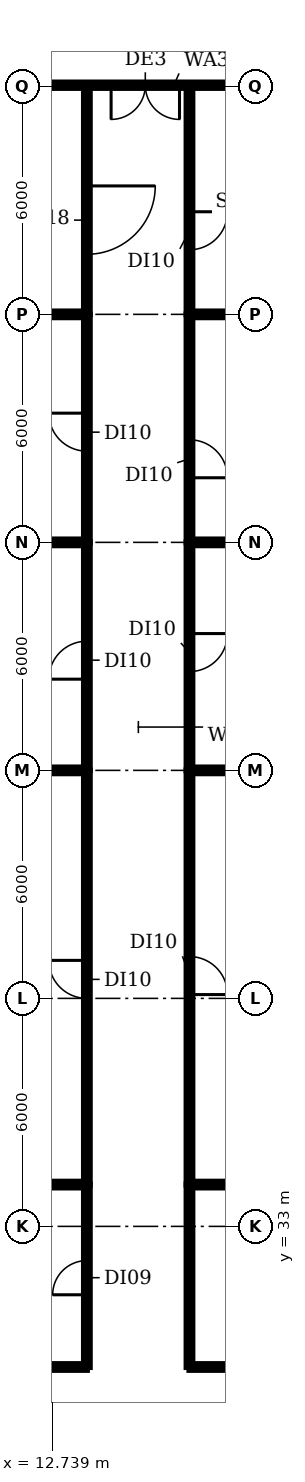
"""IFC4 building model, lengths in metres.
Left out: names, types, materials, properties, quantities, classifications, styles, units other than length and angle.
Written with IfcOpenShell. Run it as: python <this file> out.ifc"""

import sys

from ifc_helpers import new_model, si_unit, direction, frame, frame_2d, origin, place, context, subcontext, project, spatial, rectangle, extrude, element, fill, save


model = new_model("IFC4")
c1 = context("Model", 3, precision=1e-05, world=origin(), true_north=direction((0.0, 1.0)))
c2 = subcontext(c1, "Body", "Model", "MODEL_VIEW")
j1 = project(units=[si_unit("LENGTHUNIT", "METRE"), si_unit("PLANEANGLEUNIT", "RADIAN")], contexts=[c1])
p1 = place(None, origin())
s1 = spatial("IfcSite", under=j1, at=p1, CompositionType="ELEMENT")
p2 = place(p1, origin())
s2 = spatial("IfcBuilding", under=s1, at=p2, CompositionType="ELEMENT")
p3 = place(p2, frame((0.0, 0.0, 155.0)))
s3 = spatial("IfcBuildingStorey", under=s2, at=p3, CompositionType="ELEMENT", Elevation=155.0)
p4 = place(p3, frame((19.332, 63.03, 0.0), z_axis=(0.0, 0.0, 1.0), x_axis=(-1.0, 0.0, 0.0)))
e1 = element("IfcWall", 1, at=p4, inside=s3, PredefinedType="SOLIDWALL", context=c2, shape_type="SweptSolid", body=[
    extrude(rectangle(XDim=6.787, YDim=0.14, at=frame_2d((3.394, 0.0))), origin(), (0.0, 0.0, 1.0), 3.85),
])
p5 = place(p4, frame((3.244, 0.0, 0.0)))
e2 = element("IfcOpeningElement", 2, at=p5, cuts=e1, PredefinedType="OPENING", context=c2, shape_type="SweptSolid", body=[
    extrude(rectangle(XDim=1.8, YDim=2.4, at=frame_2d((0.9, 1.2))), frame((0.0, 0.08, 0.0), z_axis=(0.0, -1.0, 0.0), x_axis=(1.0, 0.0, 0.0)), (0.0, 0.0, 1.0), 0.16),
])
p6 = place(p3, frame((-0.98, 34.1, 0.0), z_axis=(0.0, 0.0, 1.0), x_axis=(1.0, 0.0, 0.0)))
e3 = element("IfcWall", 3, at=p6, inside=s3, PredefinedType="PARTITIONING", context=c2, shape_type="SweptSolid", body=[
    extrude(rectangle(XDim=14.63, YDim=0.15, at=frame_2d((7.315, 0.0))), origin(), (0.0, 0.0, 1.0), 2.88),
])
for number, where, z_axis, x_axis in (
    (4, (-0.965, 45.0, 0.0), (0.0, 0.0, 1.0), (1.0, 0.0, 0.0)),
    (5, (-0.965, 51.0, 0.0), (0.0, 0.0, 1.0), (1.0, 0.0, 0.0)),
    (6, (-0.965, 57.0, 0.0), (0.0, 0.0, 1.0), (1.0, 0.0, 0.0)),
):
    element("IfcWall", number, at=place(p3, frame(where, z_axis=z_axis, x_axis=x_axis)), inside=s3, PredefinedType="PARTITIONING", context=c2, shape_type="SweptSolid", body=[
        extrude(rectangle(XDim=14.615, YDim=0.15, at=frame_2d((7.308, 0.0))), origin(), (0.0, 0.0, 1.0), 2.88),
    ])
p7 = place(p3, frame((8.8, 29.3, 0.0), z_axis=(0.0, 0.0, 1.0), x_axis=(1.0, 0.0, 0.0)))
e7 = element("IfcWall", 7, at=p7, inside=s3, PredefinedType="PARTITIONING", context=c2, shape_type="SweptSolid", body=[
    extrude(rectangle(XDim=4.85, YDim=0.15, at=frame_2d((2.425, 0.0))), origin(), (0.0, 0.0, 1.0), 2.88),
])
p8 = place(p3, frame((13.65, 29.3, 0.0), z_axis=(0.0, 0.0, 1.0), x_axis=(0.0, 1.0, 0.0)))
e8 = element("IfcWall", 8, at=p8, inside=s3, PredefinedType="PARTITIONING", context=c2, shape_type="SweptSolid", body=[
    extrude(rectangle(XDim=4.8, YDim=0.15, at=frame_2d((2.4, 0.0))), origin(), (0.0, 0.0, 1.0), 2.88),
])
p9 = place(p8, frame((1.9, 0.0, 0.0)))
e9 = element("IfcOpeningElement", 9, at=p9, cuts=e8, PredefinedType="OPENING", context=c2, shape_type="SweptSolid", body=[
    extrude(rectangle(XDim=0.9, YDim=2.1, at=frame_2d((0.45, 1.05))), frame((0.0, 0.085, 0.0), z_axis=(0.0, -1.0, 0.0), x_axis=(1.0, 0.0, 0.0)), (0.0, 0.0, 1.0), 0.17),
])
p10 = place(p3, frame((13.65, 34.1, 0.0), z_axis=(0.0, 0.0, 1.0), x_axis=(0.0, 1.0, 0.0)))
e10 = element("IfcWall", 10, at=p10, inside=s3, PredefinedType="PARTITIONING", context=c2, shape_type="SweptSolid", body=[
    extrude(rectangle(XDim=10.9, YDim=0.15, at=frame_2d((5.45, 0.0))), origin(), (0.0, 0.0, 1.0), 2.88),
])
p11 = place(p10, frame((4.9, 0.0, 0.0)))
e11 = element("IfcOpeningElement", 11, at=p11, cuts=e10, PredefinedType="OPENING", context=c2, shape_type="SweptSolid", body=[
    extrude(rectangle(XDim=1.0, YDim=2.1, at=frame_2d((0.5, 1.05))), frame((0.0, 0.085, 0.0), z_axis=(0.0, -1.0, 0.0), x_axis=(1.0, 0.0, 0.0)), (0.0, 0.0, 1.0), 0.17),
])
p12 = place(p3, frame((13.65, 45.0, 0.0), z_axis=(0.0, 0.0, 1.0), x_axis=(0.0, 1.0, 0.0)))
e12 = element("IfcWall", 12, at=p12, inside=s3, PredefinedType="PARTITIONING", context=c2, shape_type="SweptSolid", body=[
    extrude(rectangle(XDim=6.0, YDim=0.15, at=frame_2d((3.0, 0.0))), origin(), (0.0, 0.0, 1.0), 2.88),
])
p13 = place(p12, frame((2.4, 0.0, 0.0)))
e13 = element("IfcOpeningElement", 13, at=p13, cuts=e12, PredefinedType="OPENING", context=c2, shape_type="SweptSolid", body=[
    extrude(rectangle(XDim=1.0, YDim=2.1, at=frame_2d((0.5, 1.05))), frame((0.0, 0.085, 0.0), z_axis=(0.0, -1.0, 0.0), x_axis=(1.0, 0.0, 0.0)), (0.0, 0.0, 1.0), 0.17),
])
p14 = place(p3, frame((13.65, 51.0, 0.0), z_axis=(0.0, 0.0, 1.0), x_axis=(0.0, 1.0, 0.0)))
e14 = element("IfcWall", 14, at=p14, inside=s3, PredefinedType="PARTITIONING", context=c2, shape_type="SweptSolid", body=[
    extrude(rectangle(XDim=6.0, YDim=0.15, at=frame_2d((3.0, 0.0))), origin(), (0.0, 0.0, 1.0), 2.88),
])
p15 = place(p14, frame((2.4, 0.0, 0.0)))
e15 = element("IfcOpeningElement", 15, at=p15, cuts=e14, PredefinedType="OPENING", context=c2, shape_type="SweptSolid", body=[
    extrude(rectangle(XDim=1.0, YDim=2.1, at=frame_2d((0.5, 1.05))), frame((0.0, 0.085, 0.0), z_axis=(0.0, -1.0, 0.0), x_axis=(1.0, 0.0, 0.0)), (0.0, 0.0, 1.0), 0.17),
])
p16 = place(p3, frame((13.65, 62.98, 0.0), z_axis=(0.0, 0.0, 1.0), x_axis=(0.0, -1.0, 0.0)))
e16 = element("IfcWall", 16, at=p16, inside=s3, PredefinedType="PARTITIONING", context=c2, shape_type="SweptSolid", body=[
    extrude(rectangle(XDim=5.98, YDim=0.15, at=frame_2d((2.99, 0.0))), origin(), (0.0, 0.0, 1.0), 2.88),
])
p17 = place(p16, frame((2.6, 0.0, 0.0)))
e17 = element("IfcOpeningElement", 17, at=p17, cuts=e16, PredefinedType="OPENING", context=c2, shape_type="SweptSolid", body=[
    extrude(rectangle(XDim=1.8, YDim=2.1, at=frame_2d((0.9, 1.05))), frame((0.0, 0.085, 0.0), z_axis=(0.0, -1.0, 0.0), x_axis=(1.0, 0.0, 0.0)), (0.0, 0.0, 1.0), 0.17),
])
p18 = place(p3, frame((16.35, 29.3, 0.0), z_axis=(0.0, 0.0, 1.0), x_axis=(0.0, 1.0, 0.0)))
e18 = element("IfcWall", 18, at=p18, inside=s3, PredefinedType="PARTITIONING", context=c2, shape_type="SweptSolid", body=[
    extrude(rectangle(XDim=4.8, YDim=0.15, at=frame_2d((2.4, 0.0))), origin(), (0.0, 0.0, 1.0), 2.88),
])
p19 = place(p3, frame((16.35, 29.3, 0.0), z_axis=(0.0, 0.0, 1.0), x_axis=(1.0, 0.0, 0.0)))
e19 = element("IfcWall", 19, at=p19, inside=s3, PredefinedType="PARTITIONING", context=c2, shape_type="SweptSolid", body=[
    extrude(rectangle(XDim=5.51, YDim=0.15, at=frame_2d((2.755, 0.0))), origin(), (0.0, 0.0, 1.0), 2.88),
])
p20 = place(p3, frame((16.35, 34.1, 0.0), z_axis=(0.0, 0.0, 1.0), x_axis=(1.0, 0.0, 0.0)))
e20 = element("IfcWall", 20, at=p20, inside=s3, PredefinedType="PARTITIONING", context=c2, shape_type="SweptSolid", body=[
    extrude(rectangle(XDim=9.11, YDim=0.15, at=frame_2d((4.555, 0.0))), origin(), (0.0, 0.0, 1.0), 2.88),
])
p21 = place(p3, frame((16.35, 45.0, 0.0), z_axis=(0.0, 0.0, 1.0), x_axis=(0.0, -1.0, 0.0)))
e21 = element("IfcWall", 21, at=p21, inside=s3, PredefinedType="PARTITIONING", context=c2, shape_type="SweptSolid", body=[
    extrude(rectangle(XDim=10.9, YDim=0.15, at=frame_2d((5.45, 0.0))), origin(), (0.0, 0.0, 1.0), 2.88),
])
p22 = place(p21, frame((4.9, 0.0, 0.0)))
e22 = element("IfcOpeningElement", 22, at=p22, cuts=e21, PredefinedType="OPENING", context=c2, shape_type="SweptSolid", body=[
    extrude(rectangle(XDim=1.0, YDim=2.1, at=frame_2d((0.5, 1.05))), frame((0.0, 0.085, 0.0), z_axis=(0.0, -1.0, 0.0), x_axis=(1.0, 0.0, 0.0)), (0.0, 0.0, 1.0), 0.17),
])
p23 = place(p3, frame((16.35, 45.0, 0.0), z_axis=(0.0, 0.0, 1.0), x_axis=(1.0, 0.0, 0.0)))
e23 = element("IfcWall", 23, at=p23, inside=s3, PredefinedType="PARTITIONING", context=c2, shape_type="SweptSolid", body=[
    extrude(rectangle(XDim=9.78, YDim=0.15, at=frame_2d((4.89, 0.0))), origin(), (0.0, 0.0, 1.0), 2.88),
])
p24 = place(p3, frame((16.35, 51.0, 0.0), z_axis=(0.0, 0.0, 1.0), x_axis=(0.0, -1.0, 0.0)))
e24 = element("IfcWall", 24, at=p24, inside=s3, PredefinedType="PARTITIONING", context=c2, shape_type="SweptSolid", body=[
    extrude(rectangle(XDim=6.0, YDim=0.15, at=frame_2d((3.0, 0.0))), origin(), (0.0, 0.0, 1.0), 2.88),
])
p25 = place(p24, frame((2.4, 0.0, 0.0)))
e25 = element("IfcOpeningElement", 25, at=p25, cuts=e24, PredefinedType="OPENING", context=c2, shape_type="SweptSolid", body=[
    extrude(rectangle(XDim=1.0, YDim=2.1, at=frame_2d((0.5, 1.05))), frame((0.0, 0.085, 0.0), z_axis=(0.0, -1.0, 0.0), x_axis=(1.0, 0.0, 0.0)), (0.0, 0.0, 1.0), 0.17),
])
p26 = place(p3, frame((16.35, 51.0, 0.0), z_axis=(0.0, 0.0, 1.0), x_axis=(1.0, 0.0, 0.0)))
e26 = element("IfcWall", 26, at=p26, inside=s3, PredefinedType="PARTITIONING", context=c2, shape_type="SweptSolid", body=[
    extrude(rectangle(XDim=10.14, YDim=0.15, at=frame_2d((5.07, 0.0))), origin(), (0.0, 0.0, 1.0), 2.88),
])
p27 = place(p3, frame((16.35, 57.0, 0.0), z_axis=(0.0, 0.0, 1.0), x_axis=(0.0, -1.0, 0.0)))
e27 = element("IfcWall", 27, at=p27, inside=s3, PredefinedType="PARTITIONING", context=c2, shape_type="SweptSolid", body=[
    extrude(rectangle(XDim=6.0, YDim=0.15, at=frame_2d((3.0, 0.0))), origin(), (0.0, 0.0, 1.0), 2.88),
])
p28 = place(p27, frame((3.3, 0.0, 0.0)))
e28 = element("IfcOpeningElement", 28, at=p28, cuts=e27, PredefinedType="OPENING", context=c2, shape_type="SweptSolid", body=[
    extrude(rectangle(XDim=1.0, YDim=2.1, at=frame_2d((0.5, 1.05))), frame((0.0, 0.085, 0.0), z_axis=(0.0, -1.0, 0.0), x_axis=(1.0, 0.0, 0.0)), (0.0, 0.0, 1.0), 0.17),
])
p29 = place(p3, frame((16.35, 57.0, 0.0), z_axis=(0.0, 0.0, 1.0), x_axis=(1.0, 0.0, 0.0)))
e29 = element("IfcWall", 29, at=p29, inside=s3, PredefinedType="PARTITIONING", context=c2, shape_type="SweptSolid", body=[
    extrude(rectangle(XDim=10.51, YDim=0.15, at=frame_2d((5.255, 0.0))), origin(), (0.0, 0.0, 1.0), 2.88),
])
p30 = place(p3, frame((16.35, 62.98, 0.0), z_axis=(0.0, 0.0, 1.0), x_axis=(0.0, -1.0, 0.0)))
e30 = element("IfcWall", 30, at=p30, inside=s3, PredefinedType="PARTITIONING", context=c2, shape_type="SweptSolid", body=[
    extrude(rectangle(XDim=5.98, YDim=0.15, at=frame_2d((2.99, 0.0))), origin(), (0.0, 0.0, 1.0), 2.88),
])
p31 = place(p30, frame((3.28, 0.0, 0.0)))
e31 = element("IfcOpeningElement", 31, at=p31, cuts=e30, PredefinedType="OPENING", context=c2, shape_type="SweptSolid", body=[
    extrude(rectangle(XDim=1.0, YDim=2.1, at=frame_2d((0.5, 1.05))), frame((0.0, 0.085, 0.0), z_axis=(0.0, -1.0, 0.0), x_axis=(1.0, 0.0, 0.0)), (0.0, 0.0, 1.0), 0.17),
])
p32 = place(p5, origin())
e32 = element("IfcDoor", 32, at=p32, inside=s3, OperationType="DOUBLE_DOOR_DOUBLE_SWING", PredefinedType="DOOR", context=c2, shape_type="SweptSolid", body=[
    extrude(rectangle(XDim=1.8, YDim=2.4, at=frame_2d((0.9, 1.2))), frame((0.0, 0.025, 0.0), z_axis=(0.0, -1.0, 0.0), x_axis=(1.0, 0.0, 0.0)), (0.0, 0.0, 1.0), 0.05),
])
fill(e2, e32)
p33 = place(p9, origin())
e33 = element("IfcDoor", 33, at=p33, inside=s3, OperationType="SINGLE_SWING_LEFT", PredefinedType="DOOR", context=c2, shape_type="SweptSolid", body=[
    extrude(rectangle(XDim=0.9, YDim=2.1, at=frame_2d((0.45, 1.05))), frame((0.0, 0.025, 0.0), z_axis=(0.0, -1.0, 0.0), x_axis=(1.0, 0.0, 0.0)), (0.0, 0.0, 1.0), 0.05),
])
fill(e9, e33)
p34 = place(p11, origin())
e34 = element("IfcDoor", 34, at=p34, inside=s3, OperationType="SINGLE_SWING_RIGHT", PredefinedType="DOOR", context=c2, shape_type="SweptSolid", body=[
    extrude(rectangle(XDim=1.0, YDim=2.1, at=frame_2d((0.5, 1.05))), frame((0.0, 0.025, 0.0), z_axis=(0.0, -1.0, 0.0), x_axis=(1.0, 0.0, 0.0)), (0.0, 0.0, 1.0), 0.05),
])
fill(e11, e34)
p35 = place(p13, origin())
e35 = element("IfcDoor", 35, at=p35, inside=s3, OperationType="SINGLE_SWING_LEFT", PredefinedType="DOOR", context=c2, shape_type="SweptSolid", body=[
    extrude(rectangle(XDim=1.0, YDim=2.1, at=frame_2d((0.5, 1.05))), frame((0.0, 0.025, 0.0), z_axis=(0.0, -1.0, 0.0), x_axis=(1.0, 0.0, 0.0)), (0.0, 0.0, 1.0), 0.05),
])
fill(e13, e35)
p36 = place(p15, origin())
e36 = element("IfcDoor", 36, at=p36, inside=s3, OperationType="SINGLE_SWING_RIGHT", PredefinedType="DOOR", context=c2, shape_type="SweptSolid", body=[
    extrude(rectangle(XDim=1.0, YDim=2.1, at=frame_2d((0.5, 1.05))), frame((0.0, 0.025, 0.0), z_axis=(0.0, -1.0, 0.0), x_axis=(1.0, 0.0, 0.0)), (0.0, 0.0, 1.0), 0.05),
])
fill(e15, e36)
p37 = place(p17, origin())
e37 = element("IfcDoor", 37, at=p37, inside=s3, OperationType="SINGLE_SWING_LEFT", PredefinedType="DOOR", context=c2, shape_type="SweptSolid", body=[
    extrude(rectangle(XDim=1.8, YDim=2.1, at=frame_2d((0.9, 1.05))), frame((0.0, 0.025, 0.0), z_axis=(0.0, -1.0, 0.0), x_axis=(1.0, 0.0, 0.0)), (0.0, 0.0, 1.0), 0.05),
])
fill(e17, e37)
p38 = place(p22, origin())
e38 = element("IfcDoor", 38, at=p38, inside=s3, OperationType="SINGLE_SWING_RIGHT", PredefinedType="DOOR", context=c2, shape_type="SweptSolid", body=[
    extrude(rectangle(XDim=1.0, YDim=2.1, at=frame_2d((0.5, 1.05))), frame((0.0, 0.025, 0.0), z_axis=(0.0, -1.0, 0.0), x_axis=(1.0, 0.0, 0.0)), (0.0, 0.0, 1.0), 0.05),
])
fill(e22, e38)
p39 = place(p25, origin())
e39 = element("IfcDoor", 39, at=p39, inside=s3, OperationType="SINGLE_SWING_LEFT", PredefinedType="DOOR", context=c2, shape_type="SweptSolid", body=[
    extrude(rectangle(XDim=1.0, YDim=2.1, at=frame_2d((0.5, 1.05))), frame((0.0, 0.025, 0.0), z_axis=(0.0, -1.0, 0.0), x_axis=(1.0, 0.0, 0.0)), (0.0, 0.0, 1.0), 0.05),
])
fill(e25, e39)
p40 = place(p28, origin())
e40 = element("IfcDoor", 40, at=p40, inside=s3, OperationType="SINGLE_SWING_RIGHT", PredefinedType="DOOR", context=c2, shape_type="SweptSolid", body=[
    extrude(rectangle(XDim=1.0, YDim=2.1, at=frame_2d((0.5, 1.05))), frame((0.0, 0.025, 0.0), z_axis=(0.0, -1.0, 0.0), x_axis=(1.0, 0.0, 0.0)), (0.0, 0.0, 1.0), 0.05),
])
fill(e28, e40)
p41 = place(p31, origin())
e41 = element("IfcDoor", 41, at=p41, inside=s3, OperationType="SINGLE_SWING_LEFT", PredefinedType="DOOR", context=c2, shape_type="SweptSolid", body=[
    extrude(rectangle(XDim=1.0, YDim=2.1, at=frame_2d((0.5, 1.05))), frame((0.0, 0.025, 0.0), z_axis=(0.0, -1.0, 0.0), x_axis=(1.0, 0.0, 0.0)), (0.0, 0.0, 1.0), 0.05),
])
fill(e31, e41)
save(model, sys.argv[1])
